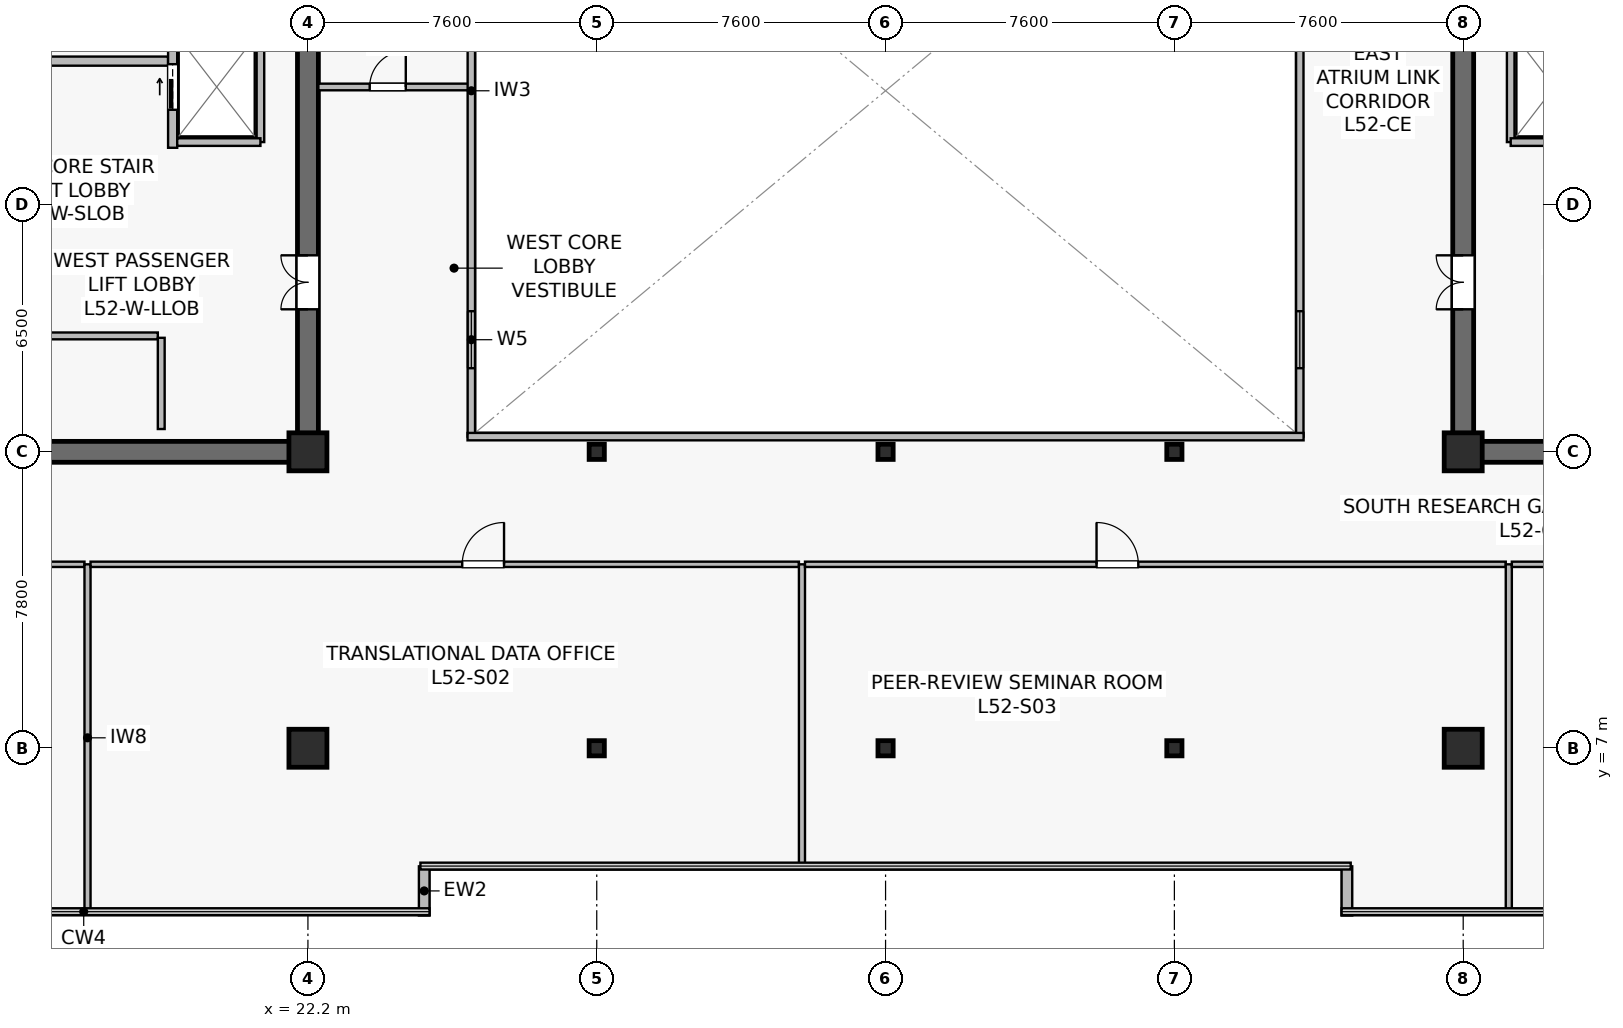
"""IFC4 building model, lengths in metres.
Left out: names, types, materials, properties, quantities, classifications, styles, units other than length and angle.
Written with IfcOpenShell. Run it as: python <this file> out.ifc"""

import sys

from ifc_helpers import new_model, si_unit, direction, frame, frame_2d, origin, origin_2d, place, context, subcontext, project, spatial, rectangle, hollow_rectangle, extrude, source, transform, mapped, element, fill, save


model = new_model("IFC4")
c1 = context("Model", 3, precision=1e-05, world=origin(), true_north=direction((0.0, 1.0)))
c2 = subcontext(c1, "Body", "Model", "MODEL_VIEW")
j1 = project(units=[si_unit("LENGTHUNIT", "METRE"), si_unit("PLANEANGLEUNIT", "RADIAN")], contexts=[c1])
p1 = place(None, origin())
s1 = spatial("IfcSite", under=j1, at=p1, CompositionType="ELEMENT")
p2 = place(p1, origin())
s2 = spatial("IfcBuilding", under=s1, at=p2, CompositionType="ELEMENT")
p3 = place(p2, frame((0.0, 0.0, 217.8)))
s3 = spatial("IfcBuildingStorey", under=s2, at=p3, CompositionType="ELEMENT", Elevation=217.8)
p4 = place(p3, frame((7.125, 14.8, 0.0), z_axis=(0.0, 0.0, 1.0), x_axis=(1.0, 0.0, 0.0)))
e1 = element("IfcWall", 1, at=p4, inside=s3, PredefinedType="SHEAR", context=c2, shape_type="SweptSolid", body=[
    extrude(rectangle(XDim=15.35, YDim=0.55, at=frame_2d((7.675, 0.0))), origin(), (0.0, 0.0, 1.0), 3.8),
])
p5 = place(p3, frame((22.2, 15.075, 0.0), z_axis=(0.0, 0.0, 1.0), x_axis=(0.0, 1.0, 0.0)))
e2 = element("IfcWall", 2, at=p5, inside=s3, PredefinedType="SHEAR", context=c2, shape_type="SweptSolid", body=[
    extrude(rectangle(XDim=18.45, YDim=0.55, at=frame_2d((9.225, 0.0))), origin(), (0.0, 0.0, 1.0), 3.8),
])
p6 = place(p5, frame((3.475, 0.0, 0.0)))
e3 = element("IfcOpeningElement", 3, at=p6, cuts=e2, PredefinedType="OPENING", context=c2, shape_type="SweptSolid", body=[
    extrude(rectangle(XDim=1.42, YDim=2.2, at=frame_2d((0.71, 1.1))), frame((0.0, 0.285, 0.0), z_axis=(0.0, -1.0, 0.0), x_axis=(1.0, 0.0, 0.0)), (0.0, 0.0, 1.0), 0.57),
])
p7 = place(p3, frame((52.325, 14.8, 0.0), z_axis=(0.0, 0.0, 1.0), x_axis=(1.0, 0.0, 0.0)))
e4 = element("IfcWall", 4, at=p7, inside=s3, PredefinedType="SHEAR", context=c2, shape_type="SweptSolid", body=[
    extrude(rectangle(XDim=15.35, YDim=0.55, at=frame_2d((7.675, 0.0))), origin(), (0.0, 0.0, 1.0), 3.8),
])
p8 = place(p3, frame((52.6, 15.075, 0.0), z_axis=(0.0, 0.0, 1.0), x_axis=(0.0, 1.0, 0.0)))
e5 = element("IfcWall", 5, at=p8, inside=s3, PredefinedType="SHEAR", context=c2, shape_type="SweptSolid", body=[
    extrude(rectangle(XDim=18.45, YDim=0.55, at=frame_2d((9.225, 0.0))), origin(), (0.0, 0.0, 1.0), 3.8),
])
p9 = place(p8, frame((3.475, 0.0, 0.0)))
e6 = element("IfcOpeningElement", 6, at=p9, cuts=e5, PredefinedType="OPENING", context=c2, shape_type="SweptSolid", body=[
    extrude(rectangle(XDim=1.42, YDim=2.2, at=frame_2d((0.71, 1.1))), frame((0.0, 0.285, 0.0), z_axis=(0.0, -1.0, 0.0), x_axis=(1.0, 0.0, 0.0)), (0.0, 0.0, 1.0), 0.57),
])
m1 = source(origin(), c2, "Body", "SweptSolid", [
    extrude(rectangle(XDim=1.0, YDim=1.0, at=origin_2d()), origin(), (0.0, 0.0, 1.0), 4.1),
])
for number, where, z_axis, x_axis in (
    (7, (22.2, 7.0, 0.0), (0.0, 0.0, 1.0), (1.0, 0.0, 0.0)),
    (8, (22.2, 14.8, 0.0), (0.0, 0.0, 1.0), (1.0, 0.0, 0.0)),
    (9, (52.6, 7.0, 0.0), (0.0, 0.0, 1.0), (1.0, 0.0, 0.0)),
    (10, (52.6, 14.8, 0.0), (0.0, 0.0, 1.0), (1.0, 0.0, 0.0)),
):
    element("IfcColumn", number, at=place(p3, frame(where, z_axis=z_axis, x_axis=x_axis)), inside=s3, PredefinedType="COLUMN", context=c2, shape_type="MappedRepresentation", body=[
        mapped(m1, transform((0.0, 0.0, 0.0), scale=1.0)),
    ])
m2 = source(origin(), c2, "Body", "SweptSolid", [
    extrude(hollow_rectangle(XDim=0.4, YDim=0.4, WallThickness=0.019, at=origin_2d()), origin(), (0.0, 0.0, 1.0), 4.1),
])
for number, where, z_axis, x_axis in (
    (11, (29.8, 7.0, 0.0), (0.0, 0.0, 1.0), (1.0, 0.0, 0.0)),
    (12, (29.8, 14.8, 0.0), (0.0, 0.0, 1.0), (1.0, 0.0, 0.0)),
    (13, (37.4, 7.0, 0.0), (0.0, 0.0, 1.0), (1.0, 0.0, 0.0)),
    (14, (37.4, 14.8, 0.0), (0.0, 0.0, 1.0), (1.0, 0.0, 0.0)),
    (15, (45.0, 7.0, 0.0), (0.0, 0.0, 1.0), (1.0, 0.0, 0.0)),
    (16, (45.0, 14.8, 0.0), (0.0, 0.0, 1.0), (1.0, 0.0, 0.0)),
):
    element("IfcColumn", number, at=place(p3, frame(where, z_axis=z_axis, x_axis=x_axis)), inside=s3, PredefinedType="COLUMN", context=c2, shape_type="MappedRepresentation", body=[
        mapped(m2, transform((0.0, 0.0, 0.0), scale=1.0)),
    ])
for number, where, z_axis, x_axis in (
    (17, (25.26, 2.6, 0.0), (0.0, 0.0, 1.0), (0.0, 1.0, 0.0)),
    (18, (49.54, 3.893, 0.0), (0.0, 0.0, 1.0), (0.0, -1.0, 0.0)),
):
    element("IfcWall", number, at=place(p3, frame(where, z_axis=z_axis, x_axis=x_axis)), inside=s3, PredefinedType="STANDARD", context=c2, shape_type="SweptSolid", body=[
        extrude(rectangle(XDim=1.293, YDim=0.28, at=frame_2d((0.646, 0.0))), origin(), (0.0, 0.0, 1.0), 3.8),
    ])
p10 = place(p3, frame((11.6, 25.08, 0.0), z_axis=(0.0, 0.0, 1.0), x_axis=(1.0, 0.0, 0.0)))
e19 = element("IfcWall", 19, at=p10, inside=s3, PredefinedType="SOLIDWALL", context=c2, shape_type="SweptSolid", body=[
    extrude(rectangle(XDim=6.92, YDim=0.24, at=frame_2d((3.46, 0.0))), origin(), (0.0, 0.0, 1.0), 3.197),
])
p11 = place(p10, frame((2.6, 0.0, 0.0)))
e20 = element("IfcOpeningElement", 20, at=p11, cuts=e19, PredefinedType="OPENING", context=c2, shape_type="SweptSolid", body=[
    extrude(rectangle(XDim=1.2, YDim=2.16, at=frame_2d((0.6, 1.08))), frame((0.0, 0.13, 0.0), z_axis=(0.0, -1.0, 0.0), x_axis=(1.0, 0.0, 0.0)), (0.0, 0.0, 1.0), 0.26),
])
p12 = place(p3, frame((18.64, 22.8, 0.0), z_axis=(0.0, 0.0, 1.0), x_axis=(0.0, 1.0, 0.0)))
e21 = element("IfcWall", 21, at=p12, inside=s3, PredefinedType="SOLIDWALL", context=c2, shape_type="SweptSolid", body=[
    extrude(rectangle(XDim=6.85, YDim=0.24, at=frame_2d((3.425, 0.0))), origin(), (0.0, 0.0, 1.0), 2.935),
])
p13 = place(p12, frame((4.85, 0.0, 0.0)))
e22 = element("IfcOpeningElement", 22, at=p13, cuts=e21, PredefinedType="OPENING", context=c2, shape_type="SweptSolid", body=[
    extrude(rectangle(XDim=1.1, YDim=2.22, at=frame_2d((0.55, 1.11))), frame((0.0, 0.13, 0.0), z_axis=(0.0, -1.0, 0.0), x_axis=(1.0, 0.0, 0.0)), (0.0, 0.0, 1.0), 0.26),
])
p14 = place(p12, frame((1.0, 0.0, 0.0)))
e23 = element("IfcOpeningElement", 23, at=p14, cuts=e21, PredefinedType="OPENING", context=c2, shape_type="SweptSolid", body=[
    extrude(rectangle(XDim=1.2, YDim=2.22, at=frame_2d((0.6, 1.11))), frame((0.0, 0.13, 0.0), z_axis=(0.0, -1.0, 0.0), x_axis=(1.0, 0.0, 0.0)), (0.0, 0.0, 1.0), 0.26),
])
p15 = place(p3, frame((20.95, 22.95, 0.0), z_axis=(0.0, 0.0, 1.0), x_axis=(0.0, 1.0, 0.0)))
e24 = element("IfcWall", 24, at=p15, inside=s3, PredefinedType="SOLIDWALL", context=c2, shape_type="SweptSolid", body=[
    extrude(rectangle(XDim=2.9, YDim=0.2, at=frame_2d((1.45, 0.0))), origin(), (0.0, 0.0, 1.0), 2.935),
])
p16 = place(p3, frame((18.76, 22.95, 0.0), z_axis=(0.0, 0.0, 1.0), x_axis=(1.0, 0.0, 0.0)))
e25 = element("IfcWall", 25, at=p16, inside=s3, PredefinedType="SOLIDWALL", context=c2, shape_type="SweptSolid", body=[
    extrude(rectangle(XDim=2.19, YDim=0.2, at=frame_2d((1.095, 0.0))), origin(), (0.0, 0.0, 1.0), 3.8),
])
p17 = place(p3, frame((7.95, 17.85, 0.0), z_axis=(0.0, 0.0, 1.0), x_axis=(1.0, 0.0, 0.0)))
e26 = element("IfcWall", 26, at=p17, inside=s3, PredefinedType="SOLIDWALL", context=c2, shape_type="SweptSolid", body=[
    extrude(rectangle(XDim=10.3, YDim=0.18, at=frame_2d((5.15, 0.0))), origin(), (0.0, 0.0, 1.0), 3.197),
])
p18 = place(p17, frame((4.675, 0.0, 0.0)))
e27 = element("IfcOpeningElement", 27, at=p18, cuts=e26, PredefinedType="OPENING", context=c2, shape_type="SweptSolid", body=[
    extrude(rectangle(XDim=0.95, YDim=2.15, at=frame_2d((0.475, 1.075))), frame((0.0, 0.1, 0.0), z_axis=(0.0, -1.0, 0.0), x_axis=(1.0, 0.0, 0.0)), (0.0, 0.0, 1.0), 0.2),
])
p19 = place(p3, frame((18.34, 15.4, 0.0), z_axis=(0.0, 0.0, 1.0), x_axis=(0.0, 1.0, 0.0)))
e28 = element("IfcWall", 28, at=p19, inside=s3, PredefinedType="SOLIDWALL", context=c2, shape_type="SweptSolid", body=[
    extrude(rectangle(XDim=2.4, YDim=0.18, at=frame_2d((1.2, 0.0))), origin(), (0.0, 0.0, 1.0), 3.8),
])
p20 = place(p3, frame((53.85, 22.95, 0.0), z_axis=(0.0, 0.0, 1.0), x_axis=(0.0, 1.0, 0.0)))
e29 = element("IfcWall", 29, at=p20, inside=s3, PredefinedType="SOLIDWALL", context=c2, shape_type="SweptSolid", body=[
    extrude(rectangle(XDim=2.9, YDim=0.2, at=frame_2d((1.45, 0.0))), origin(), (0.0, 0.0, 1.0), 2.935),
])
p21 = place(p3, frame((53.85, 22.95, 0.0), z_axis=(0.0, 0.0, 1.0), x_axis=(1.0, 0.0, 0.0)))
e30 = element("IfcWall", 30, at=p21, inside=s3, PredefinedType="SOLIDWALL", context=c2, shape_type="SweptSolid", body=[
    extrude(rectangle(XDim=2.19, YDim=0.2, at=frame_2d((1.095, 0.0))), origin(), (0.0, 0.0, 1.0), 3.8),
])
p22 = place(p3, frame((22.475, 24.4, 0.0), z_axis=(0.0, 0.0, 1.0), x_axis=(1.0, 0.0, 0.0)))
e31 = element("IfcWall", 31, at=p22, inside=s3, PredefinedType="PARTITIONING", context=c2, shape_type="SweptSolid", body=[
    extrude(rectangle(XDim=4.025, YDim=0.175, at=frame_2d((2.012, 0.0))), origin(), (0.0, 0.0, 1.0), 3.8),
])
p23 = place(p22, frame((1.35, 0.0, 0.0)))
e32 = element("IfcOpeningElement", 32, at=p23, cuts=e31, PredefinedType="OPENING", context=c2, shape_type="SweptSolid", body=[
    extrude(rectangle(XDim=0.95, YDim=2.15, at=frame_2d((0.475, 1.075))), frame((0.0, 0.098, 0.0), z_axis=(0.0, -1.0, 0.0), x_axis=(1.0, 0.0, 0.0)), (0.0, 0.0, 1.0), 0.195),
])
p24 = place(p3, frame((26.5, 15.2, 0.0), z_axis=(0.0, 0.0, 1.0), x_axis=(0.0, 1.0, 0.0)))
e33 = element("IfcWall", 33, at=p24, inside=s3, PredefinedType="SOLIDWALL", context=c2, shape_type="SweptSolid", body=[
    extrude(rectangle(XDim=18.2, YDim=0.195, at=frame_2d((9.1, 0.0))), origin(), (0.0, 0.0, 1.0), 3.8),
])
p25 = place(p24, frame((1.8, 0.0, 0.9)))
e34 = element("IfcOpeningElement", 34, at=p25, cuts=e33, PredefinedType="OPENING", context=c2, shape_type="SweptSolid", body=[
    extrude(rectangle(XDim=1.5, YDim=1.4, at=frame_2d((0.75, 0.7))), frame((0.0, 0.107, 0.0), z_axis=(0.0, -1.0, 0.0), x_axis=(1.0, 0.0, 0.0)), (0.0, 0.0, 1.0), 0.215),
])
p26 = place(p24, frame((13.2, 0.0, 0.9)))
e35 = element("IfcOpeningElement", 35, at=p26, cuts=e33, PredefinedType="OPENING", context=c2, shape_type="SweptSolid", body=[
    extrude(rectangle(XDim=1.5, YDim=1.4, at=frame_2d((0.75, 0.7))), frame((0.0, 0.107, 0.0), z_axis=(0.0, -1.0, 0.0), x_axis=(1.0, 0.0, 0.0)), (0.0, 0.0, 1.0), 0.215),
])
p27 = place(p3, frame((48.3, 15.2, 0.0), z_axis=(0.0, 0.0, 1.0), x_axis=(0.0, 1.0, 0.0)))
e36 = element("IfcWall", 36, at=p27, inside=s3, PredefinedType="SOLIDWALL", context=c2, shape_type="SweptSolid", body=[
    extrude(rectangle(XDim=18.2, YDim=0.195, at=frame_2d((9.1, 0.0))), origin(), (0.0, 0.0, 1.0), 3.8),
])
p28 = place(p27, frame((1.8, 0.0, 0.9)))
e37 = element("IfcOpeningElement", 37, at=p28, cuts=e36, PredefinedType="OPENING", context=c2, shape_type="SweptSolid", body=[
    extrude(rectangle(XDim=1.5, YDim=1.4, at=frame_2d((0.75, 0.7))), frame((0.0, 0.107, 0.0), z_axis=(0.0, -1.0, 0.0), x_axis=(1.0, 0.0, 0.0)), (0.0, 0.0, 1.0), 0.215),
])
p29 = place(p27, frame((13.2, 0.0, 0.9)))
e38 = element("IfcOpeningElement", 38, at=p29, cuts=e36, PredefinedType="OPENING", context=c2, shape_type="SweptSolid", body=[
    extrude(rectangle(XDim=1.5, YDim=1.4, at=frame_2d((0.75, 0.7))), frame((0.0, 0.107, 0.0), z_axis=(0.0, -1.0, 0.0), x_axis=(1.0, 0.0, 0.0)), (0.0, 0.0, 1.0), 0.215),
])
p30 = place(p3, frame((26.4, 15.2, 0.0), z_axis=(0.0, 0.0, 1.0), x_axis=(1.0, 0.0, 0.0)))
e39 = element("IfcWall", 39, at=p30, inside=s3, PredefinedType="SOLIDWALL", context=c2, shape_type="SweptSolid", body=[
    extrude(rectangle(XDim=22.0, YDim=0.195, at=frame_2d((11.0, 0.0))), origin(), (0.0, 0.0, 1.0), 3.8),
])
p31 = place(p3, frame((7.31, 11.84, 0.0), z_axis=(0.0, 0.0, 1.0), x_axis=(1.0, 0.0, 0.0)))
e40 = element("IfcWall", 40, at=p31, inside=s3, PredefinedType="PARTITIONING", context=c2, shape_type="SweptSolid", body=[
    extrude(rectangle(XDim=9.01, YDim=0.14, at=frame_2d((4.505, 0.0))), origin(), (0.0, 0.0, 1.0), 3.197),
])
p32 = place(p31, frame((3.522, 0.0, 0.0)))
e41 = element("IfcOpeningElement", 41, at=p32, cuts=e40, PredefinedType="OPENING", context=c2, shape_type="SweptSolid", body=[
    extrude(rectangle(XDim=1.1, YDim=2.18, at=frame_2d((0.55, 1.09))), frame((0.0, 0.08, 0.0), z_axis=(0.0, -1.0, 0.0), x_axis=(1.0, 0.0, 0.0)), (0.0, 0.0, 1.0), 0.16),
])
p33 = place(p3, frame((16.4, 2.71, 0.0), z_axis=(0.0, 0.0, 1.0), x_axis=(0.0, 1.0, 0.0)))
e42 = element("IfcWall", 42, at=p33, inside=s3, PredefinedType="PARTITIONING", context=c2, shape_type="SweptSolid", body=[
    extrude(rectangle(XDim=9.13, YDim=0.16, at=frame_2d((4.565, 0.0))), origin(), (0.0, 0.0, 1.0), 3.135),
])
p34 = place(p3, frame((16.48, 11.84, 0.0), z_axis=(0.0, 0.0, 1.0), x_axis=(1.0, 0.0, 0.0)))
e43 = element("IfcWall", 43, at=p34, inside=s3, PredefinedType="PARTITIONING", context=c2, shape_type="SweptSolid", body=[
    extrude(rectangle(XDim=18.64, YDim=0.14, at=frame_2d((9.32, 0.0))), origin(), (0.0, 0.0, 1.0), 3.197),
])
p35 = place(p34, frame((9.781, 0.0, 0.0)))
e44 = element("IfcOpeningElement", 44, at=p35, cuts=e43, PredefinedType="OPENING", context=c2, shape_type="SweptSolid", body=[
    extrude(rectangle(XDim=1.1, YDim=2.18, at=frame_2d((0.55, 1.09))), frame((0.0, 0.08, 0.0), z_axis=(0.0, -1.0, 0.0), x_axis=(1.0, 0.0, 0.0)), (0.0, 0.0, 1.0), 0.16),
])
p36 = place(p3, frame((35.2, 3.91, 0.0), z_axis=(0.0, 0.0, 1.0), x_axis=(0.0, 1.0, 0.0)))
e45 = element("IfcWall", 45, at=p36, inside=s3, PredefinedType="PARTITIONING", context=c2, shape_type="SweptSolid", body=[
    extrude(rectangle(XDim=7.93, YDim=0.16, at=frame_2d((3.965, 0.0))), origin(), (0.0, 0.0, 1.0), 3.135),
])
p37 = place(p3, frame((35.28, 11.84, 0.0), z_axis=(0.0, 0.0, 1.0), x_axis=(1.0, 0.0, 0.0)))
e46 = element("IfcWall", 46, at=p37, inside=s3, PredefinedType="PARTITIONING", context=c2, shape_type="SweptSolid", body=[
    extrude(rectangle(XDim=18.44, YDim=0.14, at=frame_2d((9.22, 0.0))), origin(), (0.0, 0.0, 1.0), 3.197),
])
p38 = place(p37, frame((7.672, 0.0, 0.0)))
e47 = element("IfcOpeningElement", 47, at=p38, cuts=e46, PredefinedType="OPENING", context=c2, shape_type="SweptSolid", body=[
    extrude(rectangle(XDim=1.1, YDim=2.18, at=frame_2d((0.55, 1.09))), frame((0.0, 0.08, 0.0), z_axis=(0.0, -1.0, 0.0), x_axis=(1.0, 0.0, 0.0)), (0.0, 0.0, 1.0), 0.16),
])
p39 = place(p3, frame((53.8, 2.71, 0.0), z_axis=(0.0, 0.0, 1.0), x_axis=(0.0, 1.0, 0.0)))
e48 = element("IfcWall", 48, at=p39, inside=s3, PredefinedType="PARTITIONING", context=c2, shape_type="SweptSolid", body=[
    extrude(rectangle(XDim=9.13, YDim=0.16, at=frame_2d((4.565, 0.0))), origin(), (0.0, 0.0, 1.0), 3.135),
])
p40 = place(p3, frame((53.88, 11.84, 0.0), z_axis=(0.0, 0.0, 1.0), x_axis=(1.0, 0.0, 0.0)))
e49 = element("IfcWall", 49, at=p40, inside=s3, PredefinedType="PARTITIONING", context=c2, shape_type="SweptSolid", body=[
    extrude(rectangle(XDim=13.61, YDim=0.14, at=frame_2d((6.805, 0.0))), origin(), (0.0, 0.0, 1.0), 3.197),
])
p41 = place(p40, frame((6.964, 0.0, 0.0)))
e50 = element("IfcOpeningElement", 50, at=p41, cuts=e49, PredefinedType="OPENING", context=c2, shape_type="SweptSolid", body=[
    extrude(rectangle(XDim=1.1, YDim=2.18, at=frame_2d((0.55, 1.09))), frame((0.0, 0.08, 0.0), z_axis=(0.0, -1.0, 0.0), x_axis=(1.0, 0.0, 0.0)), (0.0, 0.0, 1.0), 0.16),
])
m3 = source(origin(), c2, "Body", "SweptSolid", [
    extrude(rectangle(XDim=1.5, YDim=1.4, at=frame_2d((0.75, 0.7))), frame((0.0, 0.03, 0.0), z_axis=(0.0, -1.0, 0.0), x_axis=(1.0, 0.0, 0.0)), (0.0, 0.0, 1.0), 0.06),
])
p42 = place(p25, origin())
e51 = element("IfcWindow", 51, at=p42, inside=s3, PartitioningType="SINGLE_PANEL", PredefinedType="WINDOW", context=c2, shape_type="MappedRepresentation", body=[
    mapped(m3, transform((0.0, 0.0, 0.0), scale=1.0)),
])
fill(e34, e51)
p43 = place(p28, origin())
e52 = element("IfcWindow", 52, at=p43, inside=s3, PartitioningType="SINGLE_PANEL", PredefinedType="WINDOW", context=c2, shape_type="MappedRepresentation", body=[
    mapped(m3, transform((0.0, 0.0, 0.0), scale=1.0)),
])
fill(e37, e52)
m4 = source(origin(), c2, "Body", "SweptSolid", [
    extrude(rectangle(XDim=1.2, YDim=2.22, at=frame_2d((0.6, 1.11))), frame((0.0, 0.025, 0.0), z_axis=(0.0, -1.0, 0.0), x_axis=(1.0, 0.0, 0.0)), (0.0, 0.0, 1.0), 0.05),
])
p44 = place(p14, origin())
e53 = element("IfcDoor", 53, at=p44, inside=s3, OperationType="SLIDING_TO_RIGHT", PredefinedType="USERDEFINED", context=c2, shape_type="MappedRepresentation", body=[
    mapped(m4, transform((0.0, 0.0, 0.0), scale=1.0)),
])
fill(e23, e53)
m5 = source(origin(), c2, "Body", "SweptSolid", [
    extrude(rectangle(XDim=1.42, YDim=2.2, at=frame_2d((0.71, 1.1))), frame((0.0, 0.025, 0.0), z_axis=(0.0, -1.0, 0.0), x_axis=(1.0, 0.0, 0.0)), (0.0, 0.0, 1.0), 0.05),
])
p45 = place(p6, origin())
e54 = element("IfcDoor", 54, at=p45, inside=s3, OperationType="DOUBLE_DOOR_SINGLE_SWING", PredefinedType="DOOR", context=c2, shape_type="MappedRepresentation", body=[
    mapped(m5, transform((0.0, 0.0, 0.0), scale=1.0)),
])
fill(e3, e54)
p46 = place(p9, origin())
e55 = element("IfcDoor", 55, at=p46, inside=s3, OperationType="DOUBLE_DOOR_SINGLE_SWING", PredefinedType="DOOR", context=c2, shape_type="MappedRepresentation", body=[
    mapped(m5, transform((0.0, 0.0, 0.0), scale=1.0)),
])
fill(e6, e55)
m6 = source(origin(), c2, "Body", "SweptSolid", [
    extrude(rectangle(XDim=0.95, YDim=2.15, at=frame_2d((0.475, 1.075))), frame((0.0, 0.025, 0.0), z_axis=(0.0, -1.0, 0.0), x_axis=(1.0, 0.0, 0.0)), (0.0, 0.0, 1.0), 0.05),
])
p47 = place(p23, origin())
e56 = element("IfcDoor", 56, at=p47, inside=s3, OperationType="SINGLE_SWING_RIGHT", PredefinedType="DOOR", context=c2, shape_type="MappedRepresentation", body=[
    mapped(m6, transform((0.0, 0.0, 0.0), scale=1.0)),
])
fill(e32, e56)
m7 = source(origin(), c2, "Body", "SweptSolid", [
    extrude(rectangle(XDim=1.1, YDim=2.18, at=frame_2d((0.55, 1.09))), frame((0.0, 0.025, 0.0), z_axis=(0.0, -1.0, 0.0), x_axis=(1.0, 0.0, 0.0)), (0.0, 0.0, 1.0), 0.05),
])
p48 = place(p35, origin())
e57 = element("IfcDoor", 57, at=p48, inside=s3, OperationType="SINGLE_SWING_RIGHT", PredefinedType="DOOR", context=c2, shape_type="MappedRepresentation", body=[
    mapped(m7, transform((0.0, 0.0, 0.0), scale=1.0)),
])
fill(e44, e57)
p49 = place(p38, origin())
e58 = element("IfcDoor", 58, at=p49, inside=s3, OperationType="SINGLE_SWING_LEFT", PredefinedType="DOOR", context=c2, shape_type="MappedRepresentation", body=[
    mapped(m7, transform((0.0, 0.0, 0.0), scale=1.0)),
])
fill(e47, e58)
save(model, sys.argv[1])
